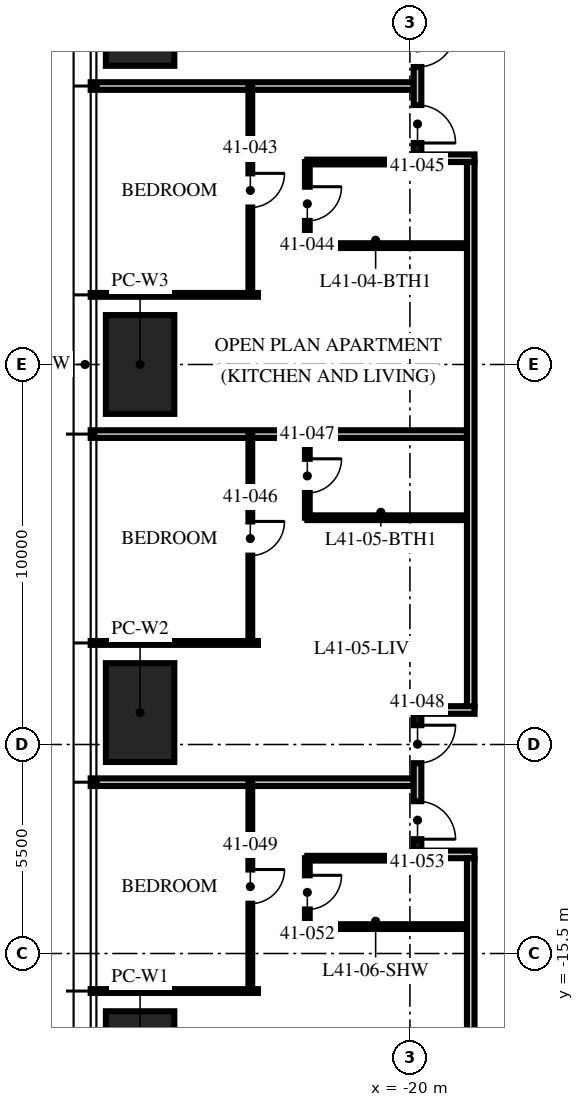
"""IFC4 building model, lengths in metres.
Left out: names, types, materials, properties, quantities, classifications, styles, units other than length and angle.
Written with IfcOpenShell. Run it as: python <this file> out.ifc"""

import sys

from ifc_helpers import new_model, si_unit, direction, frame, frame_2d, origin, origin_2d, place, context, subcontext, project, spatial, rectangle, extrude, element, fill, save


model = new_model("IFC4")
c1 = context("Model", 3, precision=1e-05, world=origin(), true_north=direction((0.0, 1.0)))
c2 = subcontext(c1, "Body", "Model", "MODEL_VIEW")
j1 = project(units=[si_unit("LENGTHUNIT", "METRE"), si_unit("PLANEANGLEUNIT", "RADIAN")], contexts=[c1])
p1 = place(None, origin())
s1 = spatial("IfcSite", under=j1, at=p1, CompositionType="ELEMENT")
p2 = place(p1, origin())
s2 = spatial("IfcBuilding", under=s1, at=p2, CompositionType="ELEMENT")
p3 = place(p2, frame((0.0, 0.0, 163.5)))
s3 = spatial("IfcBuildingStorey", under=s2, at=p3, CompositionType="ELEMENT", Elevation=163.5)
for number, where, z_axis, x_axis in (
    (1, (-27.1, -18.32, 0.0), (0.0, 0.0, 1.0), (0.0, 1.0, 0.0)),
    (2, (-27.1, -9.16, 0.0), (0.0, 0.0, 1.0), (0.0, 1.0, 0.0)),
    (3, (-27.1, 0.0, 0.0), (0.0, 0.0, 1.0), (0.0, 1.0, 0.0)),
    (4, (-27.1, 9.16, 0.0), (0.0, 0.0, 1.0), (0.0, 1.0, 0.0)),
):
    element("IfcColumn", number, at=place(p3, frame(where, z_axis=z_axis, x_axis=x_axis)), inside=s3, PredefinedType="COLUMN", context=c2, shape_type="SweptSolid", body=[
        extrude(rectangle(XDim=2.6, YDim=1.8, at=origin_2d()), origin(), (0.0, 0.0, 1.0), 3.75),
    ])
p4 = place(p3, frame((-19.9, 7.328, 0.0), z_axis=(0.0, 0.0, 1.0), x_axis=(-1.0, 0.0, 0.0)))
e5 = element("IfcWall", 5, at=p4, inside=s3, PredefinedType="PARTITIONING", context=c2, shape_type="SweptSolid", body=[
    extrude(rectangle(XDim=8.5, YDim=0.2, at=frame_2d((4.25, 0.0))), origin(), (0.0, 0.0, 1.0), 2.81),
])
p5 = place(p3, frame((-24.0, 1.832, 0.0), z_axis=(0.0, 0.0, 1.0), x_axis=(-1.0, 0.0, 0.0)))
e6 = element("IfcWall", 6, at=p5, inside=s3, PredefinedType="PARTITIONING", context=c2, shape_type="SweptSolid", body=[
    extrude(rectangle(XDim=4.4, YDim=0.1, at=frame_2d((2.2, 0.0))), origin(), (0.0, 0.0, 1.0), 2.81),
])
p6 = place(p3, frame((-18.5, -1.832, 0.0), z_axis=(0.0, 0.0, 1.0), x_axis=(-1.0, 0.0, 0.0)))
e7 = element("IfcWall", 7, at=p6, inside=s3, PredefinedType="PARTITIONING", context=c2, shape_type="SweptSolid", body=[
    extrude(rectangle(XDim=9.9, YDim=0.2, at=frame_2d((4.95, 0.0))), origin(), (0.0, 0.0, 1.0), 2.81),
])
p7 = place(p3, frame((-24.0, -7.328, 0.0), z_axis=(0.0, 0.0, 1.0), x_axis=(-1.0, 0.0, 0.0)))
e8 = element("IfcWall", 8, at=p7, inside=s3, PredefinedType="PARTITIONING", context=c2, shape_type="SweptSolid", body=[
    extrude(rectangle(XDim=4.4, YDim=0.1, at=frame_2d((2.2, 0.0))), origin(), (0.0, 0.0, 1.0), 2.81),
])
p8 = place(p3, frame((-19.9, -10.992, 0.0), z_axis=(0.0, 0.0, 1.0), x_axis=(-1.0, 0.0, 0.0)))
e9 = element("IfcWall", 9, at=p8, inside=s3, PredefinedType="PARTITIONING", context=c2, shape_type="SweptSolid", body=[
    extrude(rectangle(XDim=8.5, YDim=0.2, at=frame_2d((4.25, 0.0))), origin(), (0.0, 0.0, 1.0), 2.81),
])
p9 = place(p3, frame((-24.0, -16.488, 0.0), z_axis=(0.0, 0.0, 1.0), x_axis=(-1.0, 0.0, 0.0)))
e10 = element("IfcWall", 10, at=p9, inside=s3, PredefinedType="PARTITIONING", context=c2, shape_type="SweptSolid", body=[
    extrude(rectangle(XDim=4.4, YDim=0.1, at=frame_2d((2.2, 0.0))), origin(), (0.0, 0.0, 1.0), 2.81),
])
p10 = place(p3, frame((-24.2, 7.328, 0.0), z_axis=(0.0, 0.0, 1.0), x_axis=(0.0, -1.0, 0.0)))
e11 = element("IfcWall", 11, at=p10, inside=s3, PredefinedType="PARTITIONING", context=c2, shape_type="SweptSolid", body=[
    extrude(rectangle(XDim=5.496, YDim=0.1, at=frame_2d((2.748, 0.0))), origin(), (0.0, 0.0, 1.0), 2.81),
])
p11 = place(p10, frame((2.298, 0.0, 0.0)))
e12 = element("IfcOpeningElement", 12, at=p11, cuts=e11, PredefinedType="OPENING", context=c2, shape_type="SweptSolid", body=[
    extrude(rectangle(XDim=0.9, YDim=2.1, at=frame_2d((0.45, 1.05))), frame((0.0, 0.06, 0.0), z_axis=(0.0, -1.0, 0.0), x_axis=(1.0, 0.0, 0.0)), (0.0, 0.0, 1.0), 0.12),
])
p12 = place(p3, frame((-22.7, 5.328, 0.0), z_axis=(0.0, 0.0, 1.0), x_axis=(0.0, -1.0, 0.0)))
e13 = element("IfcWall", 13, at=p12, inside=s3, PredefinedType="PARTITIONING", context=c2, shape_type="SweptSolid", body=[
    extrude(rectangle(XDim=2.2, YDim=0.125, at=frame_2d((1.1, 0.0))), origin(), (0.0, 0.0, 1.0), 2.81),
])
p13 = place(p12, frame((0.65, 0.0, 0.0)))
e14 = element("IfcOpeningElement", 14, at=p13, cuts=e13, PredefinedType="OPENING", context=c2, shape_type="SweptSolid", body=[
    extrude(rectangle(XDim=0.9, YDim=2.1, at=frame_2d((0.45, 1.05))), frame((0.0, 0.073, 0.0), z_axis=(0.0, -1.0, 0.0), x_axis=(1.0, 0.0, 0.0)), (0.0, 0.0, 1.0), 0.145),
])
p14 = place(p3, frame((-19.97, 5.328, 0.0), z_axis=(0.0, 0.0, 1.0), x_axis=(-1.0, 0.0, 0.0)))
e15 = element("IfcWall", 15, at=p14, inside=s3, PredefinedType="PARTITIONING", context=c2, shape_type="SweptSolid", body=[
    extrude(rectangle(XDim=2.73, YDim=0.125, at=frame_2d((1.365, 0.0))), origin(), (0.0, 0.0, 1.0), 3.5),
])
p15 = place(p3, frame((-18.5, 3.128, 0.0), z_axis=(0.0, 0.0, 1.0), x_axis=(-1.0, 0.0, 0.0)))
e16 = element("IfcWall", 16, at=p15, inside=s3, PredefinedType="PARTITIONING", context=c2, shape_type="SweptSolid", body=[
    extrude(rectangle(XDim=4.2, YDim=0.125, at=frame_2d((2.1, 0.0))), origin(), (0.0, 0.0, 1.0), 3.5),
])
p16 = place(p3, frame((-24.2, -1.832, 0.0), z_axis=(0.0, 0.0, 1.0), x_axis=(0.0, -1.0, 0.0)))
e17 = element("IfcWall", 17, at=p16, inside=s3, PredefinedType="PARTITIONING", context=c2, shape_type="SweptSolid", body=[
    extrude(rectangle(XDim=5.496, YDim=0.1, at=frame_2d((2.748, 0.0))), origin(), (0.0, 0.0, 1.0), 2.81),
])
p17 = place(p16, frame((2.298, 0.0, 0.0)))
e18 = element("IfcOpeningElement", 18, at=p17, cuts=e17, PredefinedType="OPENING", context=c2, shape_type="SweptSolid", body=[
    extrude(rectangle(XDim=0.9, YDim=2.1, at=frame_2d((0.45, 1.05))), frame((0.0, 0.06, 0.0), z_axis=(0.0, -1.0, 0.0), x_axis=(1.0, 0.0, 0.0)), (0.0, 0.0, 1.0), 0.12),
])
p18 = place(p3, frame((-22.7, -1.832, 0.0), z_axis=(0.0, 0.0, 1.0), x_axis=(0.0, -1.0, 0.0)))
e19 = element("IfcWall", 19, at=p18, inside=s3, PredefinedType="PARTITIONING", context=c2, shape_type="SweptSolid", body=[
    extrude(rectangle(XDim=2.2, YDim=0.125, at=frame_2d((1.1, 0.0))), origin(), (0.0, 0.0, 1.0), 3.5),
])
p19 = place(p18, frame((0.65, 0.0, 0.0)))
e20 = element("IfcOpeningElement", 20, at=p19, cuts=e19, PredefinedType="OPENING", context=c2, shape_type="SweptSolid", body=[
    extrude(rectangle(XDim=0.9, YDim=2.1, at=frame_2d((0.45, 1.05))), frame((0.0, 0.073, 0.0), z_axis=(0.0, -1.0, 0.0), x_axis=(1.0, 0.0, 0.0)), (0.0, 0.0, 1.0), 0.145),
])
p20 = place(p3, frame((-18.5, -4.032, 0.0), z_axis=(0.0, 0.0, 1.0), x_axis=(-1.0, 0.0, 0.0)))
e21 = element("IfcWall", 21, at=p20, inside=s3, PredefinedType="PARTITIONING", context=c2, shape_type="SweptSolid", body=[
    extrude(rectangle(XDim=4.2, YDim=0.125, at=frame_2d((2.1, 0.0))), origin(), (0.0, 0.0, 1.0), 3.5),
])
p21 = place(p3, frame((-24.2, -10.992, 0.0), z_axis=(0.0, 0.0, 1.0), x_axis=(0.0, -1.0, 0.0)))
e22 = element("IfcWall", 22, at=p21, inside=s3, PredefinedType="PARTITIONING", context=c2, shape_type="SweptSolid", body=[
    extrude(rectangle(XDim=5.496, YDim=0.1, at=frame_2d((2.748, 0.0))), origin(), (0.0, 0.0, 1.0), 2.81),
])
p22 = place(p21, frame((2.298, 0.0, 0.0)))
e23 = element("IfcOpeningElement", 23, at=p22, cuts=e22, PredefinedType="OPENING", context=c2, shape_type="SweptSolid", body=[
    extrude(rectangle(XDim=0.9, YDim=2.1, at=frame_2d((0.45, 1.05))), frame((0.0, 0.06, 0.0), z_axis=(0.0, -1.0, 0.0), x_axis=(1.0, 0.0, 0.0)), (0.0, 0.0, 1.0), 0.12),
])
p23 = place(p3, frame((-22.7, -12.992, 0.0), z_axis=(0.0, 0.0, 1.0), x_axis=(0.0, -1.0, 0.0)))
e24 = element("IfcWall", 24, at=p23, inside=s3, PredefinedType="PARTITIONING", context=c2, shape_type="SweptSolid", body=[
    extrude(rectangle(XDim=1.8, YDim=0.125, at=frame_2d((0.9, 0.0))), origin(), (0.0, 0.0, 1.0), 2.81),
])
p24 = place(p23, frame((0.45, 0.0, 0.0)))
e25 = element("IfcOpeningElement", 25, at=p24, cuts=e24, PredefinedType="OPENING", context=c2, shape_type="SweptSolid", body=[
    extrude(rectangle(XDim=0.9, YDim=2.1, at=frame_2d((0.45, 1.05))), frame((0.0, 0.073, 0.0), z_axis=(0.0, -1.0, 0.0), x_axis=(1.0, 0.0, 0.0)), (0.0, 0.0, 1.0), 0.145),
])
p25 = place(p3, frame((-19.97, -12.992, 0.0), z_axis=(0.0, 0.0, 1.0), x_axis=(-1.0, 0.0, 0.0)))
e26 = element("IfcWall", 26, at=p25, inside=s3, PredefinedType="PARTITIONING", context=c2, shape_type="SweptSolid", body=[
    extrude(rectangle(XDim=2.73, YDim=0.125, at=frame_2d((1.365, 0.0))), origin(), (0.0, 0.0, 1.0), 3.5),
])
p26 = place(p3, frame((-18.5, -14.792, 0.0), z_axis=(0.0, 0.0, 1.0), x_axis=(-1.0, 0.0, 0.0)))
e27 = element("IfcWall", 27, at=p26, inside=s3, PredefinedType="PARTITIONING", context=c2, shape_type="SweptSolid", body=[
    extrude(rectangle(XDim=4.2, YDim=0.125, at=frame_2d((2.1, 0.0))), origin(), (0.0, 0.0, 1.0), 3.5),
])
p27 = place(p3, frame((-18.3, 5.428, 0.0), z_axis=(0.0, 0.0, 1.0), x_axis=(-1.0, 0.0, 0.0)))
e28 = element("IfcWall", 28, at=p27, inside=s3, PredefinedType="PARTITIONING", context=c2, shape_type="SweptSolid", body=[
    extrude(rectangle(XDim=1.6, YDim=0.2, at=frame_2d((0.8, 0.0))), origin(), (0.0, 0.0, 1.0), 3.5),
])
p28 = place(p3, frame((-19.8, 9.128, 0.0), z_axis=(0.0, 0.0, 1.0), x_axis=(0.0, -1.0, 0.0)))
e29 = element("IfcWall", 29, at=p28, inside=s3, PredefinedType="PARTITIONING", context=c2, shape_type="SweptSolid", body=[
    extrude(rectangle(XDim=3.6, YDim=0.2, at=frame_2d((1.8, 0.0))), origin(), (0.0, 0.0, 1.0), 2.7),
])
p29 = place(p28, frame((0.3, 0.0, 0.0)))
e30 = element("IfcOpeningElement", 30, at=p29, cuts=e29, PredefinedType="OPENING", context=c2, shape_type="SweptSolid", body=[
    extrude(rectangle(XDim=1.0, YDim=2.2, at=frame_2d((0.5, 1.1))), frame((0.0, 0.11, 0.0), z_axis=(0.0, -1.0, 0.0), x_axis=(1.0, 0.0, 0.0)), (0.0, 0.0, 1.0), 0.22),
])
p30 = place(p28, frame((2.3, 0.0, 0.0)))
e31 = element("IfcOpeningElement", 31, at=p30, cuts=e29, PredefinedType="OPENING", context=c2, shape_type="SweptSolid", body=[
    extrude(rectangle(XDim=1.0, YDim=2.2, at=frame_2d((0.5, 1.1))), frame((0.0, 0.11, 0.0), z_axis=(0.0, -1.0, 0.0), x_axis=(1.0, 0.0, 0.0)), (0.0, 0.0, 1.0), 0.22),
])
p31 = place(p3, frame((-18.4, 5.328, 0.0), z_axis=(0.0, 0.0, 1.0), x_axis=(0.0, -1.0, 0.0)))
e32 = element("IfcWall", 32, at=p31, inside=s3, PredefinedType="PARTITIONING", context=c2, shape_type="SweptSolid", body=[
    extrude(rectangle(XDim=14.32, YDim=0.2, at=frame_2d((7.16, 0.0))), origin(), (0.0, 0.0, 1.0), 2.7),
])
p32 = place(p3, frame((-18.3, -9.092, 0.0), z_axis=(0.0, 0.0, 1.0), x_axis=(-1.0, 0.0, 0.0)))
e33 = element("IfcWall", 33, at=p32, inside=s3, PredefinedType="PARTITIONING", context=c2, shape_type="SweptSolid", body=[
    extrude(rectangle(XDim=1.6, YDim=0.2, at=frame_2d((0.8, 0.0))), origin(), (0.0, 0.0, 1.0), 2.7),
])
p33 = place(p3, frame((-18.3, -12.892, 0.0), z_axis=(0.0, 0.0, 1.0), x_axis=(-1.0, 0.0, 0.0)))
e34 = element("IfcWall", 34, at=p33, inside=s3, PredefinedType="PARTITIONING", context=c2, shape_type="SweptSolid", body=[
    extrude(rectangle(XDim=1.6, YDim=0.2, at=frame_2d((0.8, 0.0))), origin(), (0.0, 0.0, 1.0), 3.5),
])
p34 = place(p3, frame((-19.8, -9.192, 0.0), z_axis=(0.0, 0.0, 1.0), x_axis=(0.0, -1.0, 0.0)))
e35 = element("IfcWall", 35, at=p34, inside=s3, PredefinedType="PARTITIONING", context=c2, shape_type="SweptSolid", body=[
    extrude(rectangle(XDim=3.6, YDim=0.2, at=frame_2d((1.8, 0.0))), origin(), (0.0, 0.0, 1.0), 2.7),
])
p35 = place(p34, frame((0.3, 0.0, 0.0)))
e36 = element("IfcOpeningElement", 36, at=p35, cuts=e35, PredefinedType="OPENING", context=c2, shape_type="SweptSolid", body=[
    extrude(rectangle(XDim=1.0, YDim=2.2, at=frame_2d((0.5, 1.1))), frame((0.0, 0.11, 0.0), z_axis=(0.0, -1.0, 0.0), x_axis=(1.0, 0.0, 0.0)), (0.0, 0.0, 1.0), 0.22),
])
p36 = place(p34, frame((2.3, 0.0, 0.0)))
e37 = element("IfcOpeningElement", 37, at=p36, cuts=e35, PredefinedType="OPENING", context=c2, shape_type="SweptSolid", body=[
    extrude(rectangle(XDim=1.0, YDim=2.2, at=frame_2d((0.5, 1.1))), frame((0.0, 0.11, 0.0), z_axis=(0.0, -1.0, 0.0), x_axis=(1.0, 0.0, 0.0)), (0.0, 0.0, 1.0), 0.22),
])
p37 = place(p3, frame((-18.4, -12.992, 0.0), z_axis=(0.0, 0.0, 1.0), x_axis=(0.0, -1.0, 0.0)))
e38 = element("IfcWall", 38, at=p37, inside=s3, PredefinedType="PARTITIONING", context=c2, shape_type="SweptSolid", body=[
    extrude(rectangle(XDim=5.308, YDim=0.2, at=frame_2d((2.654, 0.0))), origin(), (0.0, 0.0, 1.0), 2.3),
])
p38 = place(p29, origin())
e39 = element("IfcDoor", 39, at=p38, inside=s3, OperationType="SINGLE_SWING_LEFT", PredefinedType="DOOR", context=c2, shape_type="SweptSolid", body=[
    extrude(rectangle(XDim=1.0, YDim=2.2, at=frame_2d((0.5, 1.1))), frame((0.0, 0.025, 0.0), z_axis=(0.0, -1.0, 0.0), x_axis=(1.0, 0.0, 0.0)), (0.0, 0.0, 1.0), 0.05),
])
fill(e30, e39)
p39 = place(p11, origin())
e40 = element("IfcDoor", 40, at=p39, inside=s3, OperationType="SINGLE_SWING_LEFT", PredefinedType="DOOR", context=c2, shape_type="SweptSolid", body=[
    extrude(rectangle(XDim=0.9, YDim=2.1, at=frame_2d((0.45, 1.05))), frame((0.0, 0.025, 0.0), z_axis=(0.0, -1.0, 0.0), x_axis=(1.0, 0.0, 0.0)), (0.0, 0.0, 1.0), 0.05),
])
fill(e12, e40)
p40 = place(p13, origin())
e41 = element("IfcDoor", 41, at=p40, inside=s3, OperationType="SINGLE_SWING_LEFT", PredefinedType="DOOR", context=c2, shape_type="SweptSolid", body=[
    extrude(rectangle(XDim=0.9, YDim=2.1, at=frame_2d((0.45, 1.05))), frame((0.0, 0.025, 0.0), z_axis=(0.0, -1.0, 0.0), x_axis=(1.0, 0.0, 0.0)), (0.0, 0.0, 1.0), 0.05),
])
fill(e14, e41)
p41 = place(p30, origin())
e42 = element("IfcDoor", 42, at=p41, inside=s3, OperationType="SINGLE_SWING_RIGHT", PredefinedType="DOOR", context=c2, shape_type="SweptSolid", body=[
    extrude(rectangle(XDim=1.0, YDim=2.2, at=frame_2d((0.5, 1.1))), frame((0.0, 0.025, 0.0), z_axis=(0.0, -1.0, 0.0), x_axis=(1.0, 0.0, 0.0)), (0.0, 0.0, 1.0), 0.05),
])
fill(e31, e42)
p42 = place(p17, origin())
e43 = element("IfcDoor", 43, at=p42, inside=s3, OperationType="SINGLE_SWING_LEFT", PredefinedType="DOOR", context=c2, shape_type="SweptSolid", body=[
    extrude(rectangle(XDim=0.9, YDim=2.1, at=frame_2d((0.45, 1.05))), frame((0.0, 0.025, 0.0), z_axis=(0.0, -1.0, 0.0), x_axis=(1.0, 0.0, 0.0)), (0.0, 0.0, 1.0), 0.05),
])
fill(e18, e43)
p43 = place(p19, origin())
e44 = element("IfcDoor", 44, at=p43, inside=s3, OperationType="SINGLE_SWING_LEFT", PredefinedType="DOOR", context=c2, shape_type="SweptSolid", body=[
    extrude(rectangle(XDim=0.9, YDim=2.1, at=frame_2d((0.45, 1.05))), frame((0.0, 0.025, 0.0), z_axis=(0.0, -1.0, 0.0), x_axis=(1.0, 0.0, 0.0)), (0.0, 0.0, 1.0), 0.05),
])
fill(e20, e44)
p44 = place(p35, origin())
e45 = element("IfcDoor", 45, at=p44, inside=s3, OperationType="SINGLE_SWING_LEFT", PredefinedType="DOOR", context=c2, shape_type="SweptSolid", body=[
    extrude(rectangle(XDim=1.0, YDim=2.2, at=frame_2d((0.5, 1.1))), frame((0.0, 0.025, 0.0), z_axis=(0.0, -1.0, 0.0), x_axis=(1.0, 0.0, 0.0)), (0.0, 0.0, 1.0), 0.05),
])
fill(e36, e45)
p45 = place(p22, origin())
e46 = element("IfcDoor", 46, at=p45, inside=s3, OperationType="SINGLE_SWING_LEFT", PredefinedType="DOOR", context=c2, shape_type="SweptSolid", body=[
    extrude(rectangle(XDim=0.9, YDim=2.1, at=frame_2d((0.45, 1.05))), frame((0.0, 0.025, 0.0), z_axis=(0.0, -1.0, 0.0), x_axis=(1.0, 0.0, 0.0)), (0.0, 0.0, 1.0), 0.05),
])
fill(e23, e46)
p46 = place(p24, origin())
e47 = element("IfcDoor", 47, at=p46, inside=s3, OperationType="SINGLE_SWING_LEFT", PredefinedType="DOOR", context=c2, shape_type="SweptSolid", body=[
    extrude(rectangle(XDim=0.9, YDim=2.1, at=frame_2d((0.45, 1.05))), frame((0.0, 0.025, 0.0), z_axis=(0.0, -1.0, 0.0), x_axis=(1.0, 0.0, 0.0)), (0.0, 0.0, 1.0), 0.05),
])
fill(e25, e47)
p47 = place(p36, origin())
e48 = element("IfcDoor", 48, at=p47, inside=s3, OperationType="SINGLE_SWING_RIGHT", PredefinedType="DOOR", context=c2, shape_type="SweptSolid", body=[
    extrude(rectangle(XDim=1.0, YDim=2.2, at=frame_2d((0.5, 1.1))), frame((0.0, 0.025, 0.0), z_axis=(0.0, -1.0, 0.0), x_axis=(1.0, 0.0, 0.0)), (0.0, 0.0, 1.0), 0.05),
])
fill(e37, e48)
save(model, sys.argv[1])
